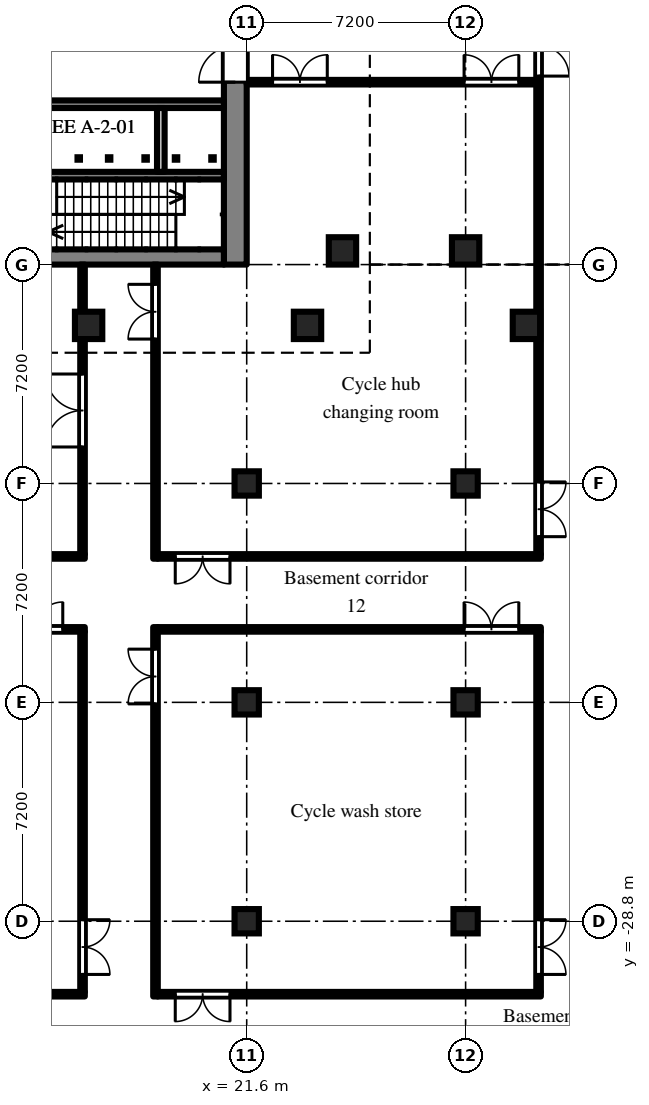
"""IFC4 building model, lengths in metres.
Left out: names, types, materials, properties, quantities, classifications, styles, units other than length and angle.
Written with IfcOpenShell. Run it as: python <this file> out.ifc"""

import sys

from ifc_helpers import new_model, si_unit, direction, frame, frame_2d, origin, origin_2d, place, context, subcontext, project, spatial, rectangle, extrude, element, fill, save


model = new_model("IFC4")
c1 = context("Model", 3, precision=1e-05, world=origin(), true_north=direction((0.0, 1.0)))
c2 = subcontext(c1, "Body", "Model", "MODEL_VIEW")
j1 = project(units=[si_unit("LENGTHUNIT", "METRE"), si_unit("PLANEANGLEUNIT", "RADIAN")], contexts=[c1])
p1 = place(None, origin())
s1 = spatial("IfcSite", under=j1, at=p1, CompositionType="ELEMENT")
p2 = place(p1, origin())
s2 = spatial("IfcBuilding", under=s1, at=p2, CompositionType="ELEMENT")
p3 = place(p2, frame((0.0, 0.0, -4.8)))
s3 = spatial("IfcBuildingStorey", under=s2, at=p3, CompositionType="ELEMENT", Elevation=-4.8)
for number, where, z_axis, x_axis in (
    (1, (24.75, -6.75, -0.5), (0.0, 0.0, 1.0), (1.0, 0.0, 0.0)),
    (2, (28.8, -6.75, -0.5), (0.0, 0.0, 1.0), (1.0, 0.0, 0.0)),
):
    element("IfcColumn", number, at=place(p3, frame(where, z_axis=z_axis, x_axis=x_axis)), inside=s3, PredefinedType="COLUMN", context=c2, shape_type="SweptSolid", body=[
        extrude(rectangle(XDim=0.9, YDim=0.9, at=origin_2d()), origin(), (0.0, 0.0, 1.0), 5.3),
    ])
for number, where, z_axis, x_axis in (
    (3, (21.6, -28.8, -0.5), (0.0, 0.0, 1.0), (1.0, 0.0, 0.0)),
    (4, (21.6, -21.6, -0.5), (0.0, 0.0, 1.0), (1.0, 0.0, 0.0)),
    (5, (21.6, -14.4, -0.5), (0.0, 0.0, 1.0), (1.0, 0.0, 0.0)),
    (6, (28.8, -28.8, -0.5), (0.0, 0.0, 1.0), (1.0, 0.0, 0.0)),
    (7, (28.8, -21.6, -0.5), (0.0, 0.0, 1.0), (1.0, 0.0, 0.0)),
    (8, (28.8, -14.4, -0.5), (0.0, 0.0, 1.0), (1.0, 0.0, 0.0)),
):
    element("IfcColumn", number, at=place(p3, frame(where, z_axis=z_axis, x_axis=x_axis)), inside=s3, PredefinedType="COLUMN", context=c2, shape_type="SweptSolid", body=[
        extrude(rectangle(XDim=0.8, YDim=0.8, at=origin_2d()), origin(), (0.0, 0.0, 1.0), 5.3),
    ])
for number, where, z_axis, x_axis in (
    (9, (16.4, -9.2, -0.5), (0.0, 0.0, 1.0), (1.0, 0.0, 0.0)),
    (10, (23.6, -9.2, -0.5), (0.0, 0.0, 1.0), (1.0, 0.0, 0.0)),
    (11, (30.8, -9.2, -0.5), (0.0, 0.0, 1.0), (1.0, 0.0, 0.0)),
):
    element("IfcColumn", number, at=place(p3, frame(where, z_axis=z_axis, x_axis=x_axis)), inside=s3, PredefinedType="COLUMN", context=c2, shape_type="SweptSolid", body=[
        extrude(rectangle(XDim=0.9, YDim=0.9, at=origin_2d()), origin(), (0.0, 0.0, 1.0), 5.3),
    ])
p4 = place(p3, frame((21.225, -7.2, 0.0), z_axis=(0.0, 0.0, 1.0), x_axis=(0.0, 1.0, 0.0)))
e12 = element("IfcWall", 12, at=p4, inside=s3, PredefinedType="SHEAR", context=c2, shape_type="SweptSolid", body=[
    extrude(rectangle(XDim=14.4, YDim=0.75, at=frame_2d((7.2, 0.0))), origin(), (0.0, 0.0, 1.0), 4.35),
])
p5 = place(p4, frame((6.0, 0.0, 0.0)))
e13 = element("IfcOpeningElement", 13, at=p5, cuts=e12, PredefinedType="OPENING", context=c2, shape_type="SweptSolid", body=[
    extrude(rectangle(XDim=2.4, YDim=2.2, at=frame_2d((1.2, 1.1))), frame((0.0, 0.385, 0.0), z_axis=(0.0, -1.0, 0.0), x_axis=(1.0, 0.0, 0.0)), (0.0, 0.0, 1.0), 0.77),
])
p6 = place(p3, frame((7.9, -6.95, 0.0), z_axis=(0.0, 0.0, 1.0), x_axis=(1.0, 0.0, 0.0)))
e14 = element("IfcWall", 14, at=p6, inside=s3, PredefinedType="SHEAR", context=c2, shape_type="SweptSolid", body=[
    extrude(rectangle(XDim=12.95, YDim=0.5, at=frame_2d((6.475, 0.0))), origin(), (0.0, 0.0, 1.0), 4.35),
])
p7 = place(p3, frame((7.9, -1.925, 0.0), z_axis=(0.0, 0.0, 1.0), x_axis=(1.0, 0.0, 0.0)))
e15 = element("IfcWall", 15, at=p7, inside=s3, PredefinedType="SHEAR", context=c2, shape_type="SweptSolid", body=[
    extrude(rectangle(XDim=12.95, YDim=0.25, at=frame_2d((6.475, 0.0))), origin(), (0.0, 0.0, 1.0), 4.35),
])
p8 = place(p7, frame((0.525, 0.0, 0.0)))
e16 = element("IfcOpeningElement", 16, at=p8, cuts=e15, PredefinedType="OPENING", context=c2, shape_type="SweptSolid", body=[
    extrude(rectangle(XDim=0.9, YDim=2.1, at=frame_2d((0.45, 1.05))), frame((0.0, 0.135, 0.0), z_axis=(0.0, -1.0, 0.0), x_axis=(1.0, 0.0, 0.0)), (0.0, 0.0, 1.0), 0.27),
])
p9 = place(p7, frame((2.625, 0.0, 0.0)))
e17 = element("IfcOpeningElement", 17, at=p9, cuts=e15, PredefinedType="OPENING", context=c2, shape_type="SweptSolid", body=[
    extrude(rectangle(XDim=1.1, YDim=2.1, at=frame_2d((0.55, 1.05))), frame((0.0, 0.135, 0.0), z_axis=(0.0, -1.0, 0.0), x_axis=(1.0, 0.0, 0.0)), (0.0, 0.0, 1.0), 0.27),
])
p10 = place(p3, frame((12.3, -4.275, 0.0), z_axis=(0.0, 0.0, 1.0), x_axis=(1.0, 0.0, 0.0)))
e18 = element("IfcWall", 18, at=p10, inside=s3, PredefinedType="SHEAR", context=c2, shape_type="SweptSolid", body=[
    extrude(rectangle(XDim=8.55, YDim=0.25, at=frame_2d((4.275, 0.0))), origin(), (0.0, 0.0, 1.0), 4.35),
])
p11 = place(p3, frame((18.775, -2.05, 0.0), z_axis=(0.0, 0.0, 1.0), x_axis=(0.0, -1.0, 0.0)))
e19 = element("IfcWall", 19, at=p11, inside=s3, PredefinedType="PARTITIONING", context=c2, shape_type="SweptSolid", body=[
    extrude(rectangle(XDim=2.1, YDim=0.25, at=frame_2d((1.05, 0.0))), origin(), (0.0, 0.0, 1.0), 4.35),
])
p12 = place(p3, frame((1.275, -31.2, 0.0), z_axis=(0.0, 0.0, 1.0), x_axis=(1.0, 0.0, 0.0)))
e20 = element("IfcWall", 20, at=p12, inside=s3, PredefinedType="PARTITIONING", context=c2, shape_type="SweptSolid", body=[
    extrude(rectangle(XDim=15.0, YDim=0.15, at=frame_2d((7.5, 0.0))), origin(), (0.0, 0.0, 1.0), 4.35),
])
p13 = place(p12, frame((0.575, 0.0, 0.0)))
e21 = element("IfcOpeningElement", 21, at=p13, cuts=e20, PredefinedType="OPENING", context=c2, shape_type="SweptSolid", body=[
    extrude(rectangle(XDim=1.8, YDim=2.1, at=frame_2d((0.9, 1.05))), frame((0.0, 0.085, 0.0), z_axis=(0.0, -1.0, 0.0), x_axis=(1.0, 0.0, 0.0)), (0.0, 0.0, 1.0), 0.17),
])
p14 = place(p3, frame((1.275, -19.2, 0.0), z_axis=(0.0, 0.0, 1.0), x_axis=(1.0, 0.0, 0.0)))
e22 = element("IfcWall", 22, at=p14, inside=s3, PredefinedType="PARTITIONING", context=c2, shape_type="SweptSolid", body=[
    extrude(rectangle(XDim=15.0, YDim=0.15, at=frame_2d((7.5, 0.0))), origin(), (0.0, 0.0, 1.0), 4.35),
])
p15 = place(p14, frame((12.475, 0.0, 0.0)))
e23 = element("IfcOpeningElement", 23, at=p15, cuts=e22, PredefinedType="OPENING", context=c2, shape_type="SweptSolid", body=[
    extrude(rectangle(XDim=1.8, YDim=2.1, at=frame_2d((0.9, 1.05))), frame((0.0, 0.085, 0.0), z_axis=(0.0, -1.0, 0.0), x_axis=(1.0, 0.0, 0.0)), (0.0, 0.0, 1.0), 0.17),
])
p16 = place(p3, frame((1.275, -16.8, 0.0), z_axis=(0.0, 0.0, 1.0), x_axis=(1.0, 0.0, 0.0)))
e24 = element("IfcWall", 24, at=p16, inside=s3, PredefinedType="PARTITIONING", context=c2, shape_type="SweptSolid", body=[
    extrude(rectangle(XDim=15.0, YDim=0.15, at=frame_2d((7.5, 0.0))), origin(), (0.0, 0.0, 1.0), 4.35),
])
p17 = place(p16, frame((8.375, 0.0, 0.0)))
e25 = element("IfcOpeningElement", 25, at=p17, cuts=e24, PredefinedType="OPENING", context=c2, shape_type="SweptSolid", body=[
    extrude(rectangle(XDim=2.4, YDim=2.1, at=frame_2d((1.2, 1.05))), frame((0.0, 0.085, 0.0), z_axis=(0.0, -1.0, 0.0), x_axis=(1.0, 0.0, 0.0)), (0.0, 0.0, 1.0), 0.17),
])
p18 = place(p3, frame((16.2, -31.125, 0.0), z_axis=(0.0, 0.0, 1.0), x_axis=(0.0, 1.0, 0.0)))
e26 = element("IfcWall", 26, at=p18, inside=s3, PredefinedType="PARTITIONING", context=c2, shape_type="SweptSolid", body=[
    extrude(rectangle(XDim=11.85, YDim=0.15, at=frame_2d((5.925, 0.0))), origin(), (0.0, 0.0, 1.0), 4.35),
])
p19 = place(p18, frame((0.575, 0.0, 0.0)))
e27 = element("IfcOpeningElement", 27, at=p19, cuts=e26, PredefinedType="OPENING", context=c2, shape_type="SweptSolid", body=[
    extrude(rectangle(XDim=1.8, YDim=2.1, at=frame_2d((0.9, 1.05))), frame((0.0, 0.085, 0.0), z_axis=(0.0, -1.0, 0.0), x_axis=(1.0, 0.0, 0.0)), (0.0, 0.0, 1.0), 0.17),
])
p20 = place(p3, frame((16.2, -16.725, 0.0), z_axis=(0.0, 0.0, 1.0), x_axis=(0.0, 1.0, 0.0)))
e28 = element("IfcWall", 28, at=p20, inside=s3, PredefinedType="PARTITIONING", context=c2, shape_type="SweptSolid", body=[
    extrude(rectangle(XDim=9.525, YDim=0.15, at=frame_2d((4.763, 0.0))), origin(), (0.0, 0.0, 1.0), 4.35),
])
p21 = place(p20, frame((3.525, 0.0, 0.0)))
e29 = element("IfcOpeningElement", 29, at=p21, cuts=e28, PredefinedType="OPENING", context=c2, shape_type="SweptSolid", body=[
    extrude(rectangle(XDim=2.4, YDim=2.1, at=frame_2d((1.2, 1.05))), frame((0.0, 0.085, 0.0), z_axis=(0.0, -1.0, 0.0), x_axis=(1.0, 0.0, 0.0)), (0.0, 0.0, 1.0), 0.17),
])
p22 = place(p3, frame((18.6, -31.275, 0.0), z_axis=(0.0, 0.0, 1.0), x_axis=(0.0, 1.0, 0.0)))
e30 = element("IfcWall", 30, at=p22, inside=s3, PredefinedType="PARTITIONING", context=c2, shape_type="SweptSolid", body=[
    extrude(rectangle(XDim=12.15, YDim=0.15, at=frame_2d((6.075, 0.0))), origin(), (0.0, 0.0, 1.0), 4.35),
])
p23 = place(p22, frame((9.625, 0.0, 0.0)))
e31 = element("IfcOpeningElement", 31, at=p23, cuts=e30, PredefinedType="OPENING", context=c2, shape_type="SweptSolid", body=[
    extrude(rectangle(XDim=1.8, YDim=2.1, at=frame_2d((0.9, 1.05))), frame((0.0, 0.085, 0.0), z_axis=(0.0, -1.0, 0.0), x_axis=(1.0, 0.0, 0.0)), (0.0, 0.0, 1.0), 0.17),
])
p24 = place(p3, frame((18.675, -31.2, 0.0), z_axis=(0.0, 0.0, 1.0), x_axis=(1.0, 0.0, 0.0)))
e32 = element("IfcWall", 32, at=p24, inside=s3, PredefinedType="PARTITIONING", context=c2, shape_type="SweptSolid", body=[
    extrude(rectangle(XDim=12.6, YDim=0.15, at=frame_2d((6.3, 0.0))), origin(), (0.0, 0.0, 1.0), 4.35),
])
p25 = place(p24, frame((0.575, 0.0, 0.0)))
e33 = element("IfcOpeningElement", 33, at=p25, cuts=e32, PredefinedType="OPENING", context=c2, shape_type="SweptSolid", body=[
    extrude(rectangle(XDim=1.8, YDim=2.1, at=frame_2d((0.9, 1.05))), frame((0.0, 0.085, 0.0), z_axis=(0.0, -1.0, 0.0), x_axis=(1.0, 0.0, 0.0)), (0.0, 0.0, 1.0), 0.17),
])
p26 = place(p3, frame((18.675, -19.2, 0.0), z_axis=(0.0, 0.0, 1.0), x_axis=(1.0, 0.0, 0.0)))
e34 = element("IfcWall", 34, at=p26, inside=s3, PredefinedType="PARTITIONING", context=c2, shape_type="SweptSolid", body=[
    extrude(rectangle(XDim=12.6, YDim=0.15, at=frame_2d((6.3, 0.0))), origin(), (0.0, 0.0, 1.0), 4.35),
])
p27 = place(p26, frame((10.075, 0.0, 0.0)))
e35 = element("IfcOpeningElement", 35, at=p27, cuts=e34, PredefinedType="OPENING", context=c2, shape_type="SweptSolid", body=[
    extrude(rectangle(XDim=1.8, YDim=2.1, at=frame_2d((0.9, 1.05))), frame((0.0, 0.085, 0.0), z_axis=(0.0, -1.0, 0.0), x_axis=(1.0, 0.0, 0.0)), (0.0, 0.0, 1.0), 0.17),
])
p28 = place(p3, frame((18.6, -16.875, 0.0), z_axis=(0.0, 0.0, 1.0), x_axis=(0.0, 1.0, 0.0)))
e36 = element("IfcWall", 36, at=p28, inside=s3, PredefinedType="PARTITIONING", context=c2, shape_type="SweptSolid", body=[
    extrude(rectangle(XDim=9.675, YDim=0.15, at=frame_2d((4.837, 0.0))), origin(), (0.0, 0.0, 1.0), 4.35),
])
p29 = place(p28, frame((7.225, 0.0, 0.0)))
e37 = element("IfcOpeningElement", 37, at=p29, cuts=e36, PredefinedType="OPENING", context=c2, shape_type="SweptSolid", body=[
    extrude(rectangle(XDim=1.8, YDim=2.1, at=frame_2d((0.9, 1.05))), frame((0.0, 0.085, 0.0), z_axis=(0.0, -1.0, 0.0), x_axis=(1.0, 0.0, 0.0)), (0.0, 0.0, 1.0), 0.17),
])
p30 = place(p3, frame((18.675, -16.8, 0.0), z_axis=(0.0, 0.0, 1.0), x_axis=(1.0, 0.0, 0.0)))
e38 = element("IfcWall", 38, at=p30, inside=s3, PredefinedType="PARTITIONING", context=c2, shape_type="SweptSolid", body=[
    extrude(rectangle(XDim=12.6, YDim=0.15, at=frame_2d((6.3, 0.0))), origin(), (0.0, 0.0, 1.0), 4.35),
])
p31 = place(p30, frame((0.575, 0.0, 0.0)))
e39 = element("IfcOpeningElement", 39, at=p31, cuts=e38, PredefinedType="OPENING", context=c2, shape_type="SweptSolid", body=[
    extrude(rectangle(XDim=1.8, YDim=2.1, at=frame_2d((0.9, 1.05))), frame((0.0, 0.085, 0.0), z_axis=(0.0, -1.0, 0.0), x_axis=(1.0, 0.0, 0.0)), (0.0, 0.0, 1.0), 0.17),
])
p32 = place(p3, frame((21.6, -1.2, 0.0), z_axis=(0.0, 0.0, 1.0), x_axis=(1.0, 0.0, 0.0)))
e40 = element("IfcWall", 40, at=p32, inside=s3, PredefinedType="PARTITIONING", context=c2, shape_type="SweptSolid", body=[
    extrude(rectangle(XDim=9.525, YDim=0.15, at=frame_2d((4.762, 0.0))), origin(), (0.0, 0.0, 1.0), 4.35),
])
p33 = place(p32, frame((0.85, 0.0, 0.0)))
e41 = element("IfcOpeningElement", 41, at=p33, cuts=e40, PredefinedType="OPENING", context=c2, shape_type="SweptSolid", body=[
    extrude(rectangle(XDim=1.8, YDim=2.1, at=frame_2d((0.9, 1.05))), frame((0.0, 0.085, 0.0), z_axis=(0.0, -1.0, 0.0), x_axis=(1.0, 0.0, 0.0)), (0.0, 0.0, 1.0), 0.17),
])
p34 = place(p32, frame((7.15, 0.0, 0.0)))
e42 = element("IfcOpeningElement", 42, at=p34, cuts=e40, PredefinedType="OPENING", context=c2, shape_type="SweptSolid", body=[
    extrude(rectangle(XDim=1.8, YDim=2.1, at=frame_2d((0.9, 1.05))), frame((0.0, 0.085, 0.0), z_axis=(0.0, -1.0, 0.0), x_axis=(1.0, 0.0, 0.0)), (0.0, 0.0, 1.0), 0.17),
])
p35 = place(p3, frame((31.2, -31.125, 0.0), z_axis=(0.0, 0.0, 1.0), x_axis=(0.0, 1.0, 0.0)))
e43 = element("IfcWall", 43, at=p35, inside=s3, PredefinedType="PARTITIONING", context=c2, shape_type="SweptSolid", body=[
    extrude(rectangle(XDim=11.85, YDim=0.15, at=frame_2d((5.925, 0.0))), origin(), (0.0, 0.0, 1.0), 4.35),
])
p36 = place(p35, frame((0.575, 0.0, 0.0)))
e44 = element("IfcOpeningElement", 44, at=p36, cuts=e43, PredefinedType="OPENING", context=c2, shape_type="SweptSolid", body=[
    extrude(rectangle(XDim=1.8, YDim=2.1, at=frame_2d((0.9, 1.05))), frame((0.0, 0.085, 0.0), z_axis=(0.0, -1.0, 0.0), x_axis=(1.0, 0.0, 0.0)), (0.0, 0.0, 1.0), 0.17),
])
p37 = place(p3, frame((31.2, -16.725, 0.0), z_axis=(0.0, 0.0, 1.0), x_axis=(0.0, 1.0, 0.0)))
e45 = element("IfcWall", 45, at=p37, inside=s3, PredefinedType="PARTITIONING", context=c2, shape_type="SweptSolid", body=[
    extrude(rectangle(XDim=33.45, YDim=0.15, at=frame_2d((16.725, 0.0))), origin(), (0.0, 0.0, 1.0), 4.35),
])
p38 = place(p37, frame((15.725, 0.0, 0.0)))
e46 = element("IfcOpeningElement", 46, at=p38, cuts=e45, PredefinedType="OPENING", context=c2, shape_type="SweptSolid", body=[
    extrude(rectangle(XDim=2.0, YDim=2.1, at=frame_2d((1.0, 1.05))), frame((0.0, 0.085, 0.0), z_axis=(0.0, -1.0, 0.0), x_axis=(1.0, 0.0, 0.0)), (0.0, 0.0, 1.0), 0.17),
])
p39 = place(p37, frame((18.575, 0.0, 0.0)))
e47 = element("IfcOpeningElement", 47, at=p39, cuts=e45, PredefinedType="OPENING", context=c2, shape_type="SweptSolid", body=[
    extrude(rectangle(XDim=1.8, YDim=2.1, at=frame_2d((0.9, 1.05))), frame((0.0, 0.085, 0.0), z_axis=(0.0, -1.0, 0.0), x_axis=(1.0, 0.0, 0.0)), (0.0, 0.0, 1.0), 0.17),
])
p40 = place(p37, frame((0.575, 0.0, 0.0)))
e48 = element("IfcOpeningElement", 48, at=p40, cuts=e45, PredefinedType="OPENING", context=c2, shape_type="SweptSolid", body=[
    extrude(rectangle(XDim=1.8, YDim=2.1, at=frame_2d((0.9, 1.05))), frame((0.0, 0.085, 0.0), z_axis=(0.0, -1.0, 0.0), x_axis=(1.0, 0.0, 0.0)), (0.0, 0.0, 1.0), 0.17),
])
p41 = place(p5, origin())
e49 = element("IfcDoor", 49, at=p41, inside=s3, OperationType="DOUBLE_DOOR_DOUBLE_SWING", PredefinedType="DOOR", context=c2, shape_type="SweptSolid", body=[
    extrude(rectangle(XDim=2.4, YDim=2.2, at=frame_2d((1.2, 1.1))), frame((0.0, 0.025, 0.0), z_axis=(0.0, -1.0, 0.0), x_axis=(1.0, 0.0, 0.0)), (0.0, 0.0, 1.0), 0.05),
])
fill(e13, e49)
p42 = place(p38, frame((2.0, 0.0, 0.0), z_axis=(0.0, 0.0, 1.0), x_axis=(-1.0, 0.0, 0.0)))
e50 = element("IfcDoor", 50, at=p42, inside=s3, OperationType="DOUBLE_DOOR_DOUBLE_SWING", PredefinedType="DOOR", context=c2, shape_type="SweptSolid", body=[
    extrude(rectangle(XDim=2.0, YDim=2.1, at=frame_2d((1.0, 1.05))), frame((0.0, 0.025, 0.0), z_axis=(0.0, -1.0, 0.0), x_axis=(1.0, 0.0, 0.0)), (0.0, 0.0, 1.0), 0.05),
])
fill(e46, e50)
p43 = place(p21, origin())
e51 = element("IfcDoor", 51, at=p43, inside=s3, OperationType="DOUBLE_DOOR_DOUBLE_SWING", PredefinedType="DOOR", context=c2, shape_type="SweptSolid", body=[
    extrude(rectangle(XDim=2.4, YDim=2.1, at=frame_2d((1.2, 1.05))), frame((0.0, 0.025, 0.0), z_axis=(0.0, -1.0, 0.0), x_axis=(1.0, 0.0, 0.0)), (0.0, 0.0, 1.0), 0.05),
])
fill(e29, e51)
p44 = place(p29, origin())
e52 = element("IfcDoor", 52, at=p44, inside=s3, OperationType="DOUBLE_DOOR_DOUBLE_SWING", PredefinedType="DOOR", context=c2, shape_type="SweptSolid", body=[
    extrude(rectangle(XDim=1.8, YDim=2.1, at=frame_2d((0.9, 1.05))), frame((0.0, 0.025, 0.0), z_axis=(0.0, -1.0, 0.0), x_axis=(1.0, 0.0, 0.0)), (0.0, 0.0, 1.0), 0.05),
])
fill(e37, e52)
p45 = place(p31, frame((1.8, 0.0, 0.0), z_axis=(0.0, 0.0, 1.0), x_axis=(-1.0, 0.0, 0.0)))
e53 = element("IfcDoor", 53, at=p45, inside=s3, OperationType="DOUBLE_DOOR_DOUBLE_SWING", PredefinedType="DOOR", context=c2, shape_type="SweptSolid", body=[
    extrude(rectangle(XDim=1.8, YDim=2.1, at=frame_2d((0.9, 1.05))), frame((0.0, 0.025, 0.0), z_axis=(0.0, -1.0, 0.0), x_axis=(1.0, 0.0, 0.0)), (0.0, 0.0, 1.0), 0.05),
])
fill(e39, e53)
p46 = place(p33, origin())
e54 = element("IfcDoor", 54, at=p46, inside=s3, OperationType="DOUBLE_DOOR_DOUBLE_SWING", PredefinedType="DOOR", context=c2, shape_type="SweptSolid", body=[
    extrude(rectangle(XDim=1.8, YDim=2.1, at=frame_2d((0.9, 1.05))), frame((0.0, 0.025, 0.0), z_axis=(0.0, -1.0, 0.0), x_axis=(1.0, 0.0, 0.0)), (0.0, 0.0, 1.0), 0.05),
])
fill(e41, e54)
p47 = place(p34, origin())
e55 = element("IfcDoor", 55, at=p47, inside=s3, OperationType="DOUBLE_DOOR_DOUBLE_SWING", PredefinedType="DOOR", context=c2, shape_type="SweptSolid", body=[
    extrude(rectangle(XDim=1.8, YDim=2.1, at=frame_2d((0.9, 1.05))), frame((0.0, 0.025, 0.0), z_axis=(0.0, -1.0, 0.0), x_axis=(1.0, 0.0, 0.0)), (0.0, 0.0, 1.0), 0.05),
])
fill(e42, e55)
p48 = place(p40, frame((1.8, 0.0, 0.0), z_axis=(0.0, 0.0, 1.0), x_axis=(-1.0, 0.0, 0.0)))
e56 = element("IfcDoor", 56, at=p48, inside=s3, OperationType="DOUBLE_DOOR_DOUBLE_SWING", PredefinedType="DOOR", context=c2, shape_type="SweptSolid", body=[
    extrude(rectangle(XDim=1.8, YDim=2.1, at=frame_2d((0.9, 1.05))), frame((0.0, 0.025, 0.0), z_axis=(0.0, -1.0, 0.0), x_axis=(1.0, 0.0, 0.0)), (0.0, 0.0, 1.0), 0.05),
])
fill(e48, e56)
p49 = place(p15, origin())
e57 = element("IfcDoor", 57, at=p49, inside=s3, OperationType="DOUBLE_DOOR_DOUBLE_SWING", PredefinedType="DOOR", context=c2, shape_type="SweptSolid", body=[
    extrude(rectangle(XDim=1.8, YDim=2.1, at=frame_2d((0.9, 1.05))), frame((0.0, 0.025, 0.0), z_axis=(0.0, -1.0, 0.0), x_axis=(1.0, 0.0, 0.0)), (0.0, 0.0, 1.0), 0.05),
])
fill(e23, e57)
p50 = place(p19, frame((1.8, 0.0, 0.0), z_axis=(0.0, 0.0, 1.0), x_axis=(-1.0, 0.0, 0.0)))
e58 = element("IfcDoor", 58, at=p50, inside=s3, OperationType="DOUBLE_DOOR_DOUBLE_SWING", PredefinedType="DOOR", context=c2, shape_type="SweptSolid", body=[
    extrude(rectangle(XDim=1.8, YDim=2.1, at=frame_2d((0.9, 1.05))), frame((0.0, 0.025, 0.0), z_axis=(0.0, -1.0, 0.0), x_axis=(1.0, 0.0, 0.0)), (0.0, 0.0, 1.0), 0.05),
])
fill(e27, e58)
p51 = place(p23, origin())
e59 = element("IfcDoor", 59, at=p51, inside=s3, OperationType="DOUBLE_DOOR_DOUBLE_SWING", PredefinedType="DOOR", context=c2, shape_type="SweptSolid", body=[
    extrude(rectangle(XDim=1.8, YDim=2.1, at=frame_2d((0.9, 1.05))), frame((0.0, 0.025, 0.0), z_axis=(0.0, -1.0, 0.0), x_axis=(1.0, 0.0, 0.0)), (0.0, 0.0, 1.0), 0.05),
])
fill(e31, e59)
p52 = place(p25, frame((1.8, 0.0, 0.0), z_axis=(0.0, 0.0, 1.0), x_axis=(-1.0, 0.0, 0.0)))
e60 = element("IfcDoor", 60, at=p52, inside=s3, OperationType="DOUBLE_DOOR_DOUBLE_SWING", PredefinedType="DOOR", context=c2, shape_type="SweptSolid", body=[
    extrude(rectangle(XDim=1.8, YDim=2.1, at=frame_2d((0.9, 1.05))), frame((0.0, 0.025, 0.0), z_axis=(0.0, -1.0, 0.0), x_axis=(1.0, 0.0, 0.0)), (0.0, 0.0, 1.0), 0.05),
])
fill(e33, e60)
p53 = place(p27, origin())
e61 = element("IfcDoor", 61, at=p53, inside=s3, OperationType="DOUBLE_DOOR_DOUBLE_SWING", PredefinedType="DOOR", context=c2, shape_type="SweptSolid", body=[
    extrude(rectangle(XDim=1.8, YDim=2.1, at=frame_2d((0.9, 1.05))), frame((0.0, 0.025, 0.0), z_axis=(0.0, -1.0, 0.0), x_axis=(1.0, 0.0, 0.0)), (0.0, 0.0, 1.0), 0.05),
])
fill(e35, e61)
p54 = place(p36, frame((1.8, 0.0, 0.0), z_axis=(0.0, 0.0, 1.0), x_axis=(-1.0, 0.0, 0.0)))
e62 = element("IfcDoor", 62, at=p54, inside=s3, OperationType="DOUBLE_DOOR_DOUBLE_SWING", PredefinedType="DOOR", context=c2, shape_type="SweptSolid", body=[
    extrude(rectangle(XDim=1.8, YDim=2.1, at=frame_2d((0.9, 1.05))), frame((0.0, 0.025, 0.0), z_axis=(0.0, -1.0, 0.0), x_axis=(1.0, 0.0, 0.0)), (0.0, 0.0, 1.0), 0.05),
])
fill(e44, e62)
save(model, sys.argv[1])
